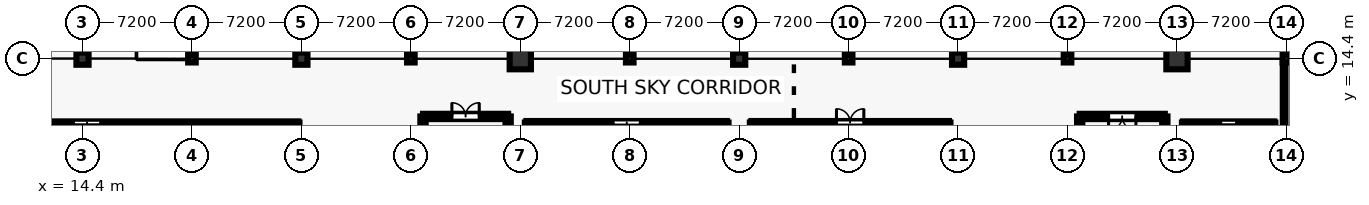
"""IFC4 building model, lengths in metres.
Left out: names, types, materials, properties, quantities, classifications, styles, units other than length and angle.
Written with IfcOpenShell. Run it as: python <this file> out.ifc"""

import sys

from ifc_helpers import new_model, si_unit, direction, frame, frame_2d, origin, origin_2d, place, context, subcontext, project, spatial, rectangle, circle, extrude, element, fill, save


model = new_model("IFC4")
c1 = context("Model", 3, precision=1e-05, world=origin(), true_north=direction((0.0, 1.0)))
c2 = subcontext(c1, "Body", "Model", "MODEL_VIEW")
j1 = project(units=[si_unit("LENGTHUNIT", "METRE"), si_unit("PLANEANGLEUNIT", "RADIAN")], contexts=[c1])
p1 = place(None, origin())
s1 = spatial("IfcSite", under=j1, at=p1, CompositionType="ELEMENT")
p2 = place(p1, origin())
s2 = spatial("IfcBuilding", under=s1, at=p2, CompositionType="ELEMENT")
p3 = place(p2, frame((0.0, 0.0, 23.0)))
s3 = spatial("IfcBuildingStorey", under=s2, at=p3, CompositionType="ELEMENT", Elevation=23.0)
p4 = place(p3, frame((14.4, 14.4, 0.0), z_axis=(0.0, 0.0, 1.0), x_axis=(1.0, 0.0, 0.0)))
e1 = element("IfcColumn", 1, at=p4, inside=s3, PredefinedType="COLUMN", context=c2, shape_type="SweptSolid", body=[
    extrude(circle(Radius=0.4, at=origin_2d()), origin(), (0.0, 0.0, 1.0), 5.92),
])
p5 = place(p3, frame((21.6, 14.4, 0.0), z_axis=(0.0, 0.0, 1.0), x_axis=(1.0, 0.0, 0.0)))
e2 = element("IfcColumn", 2, at=p5, inside=s3, PredefinedType="COLUMN", context=c2, shape_type="SweptSolid", body=[
    extrude(rectangle(XDim=0.5, YDim=0.5, at=origin_2d()), origin(), (0.0, 0.0, 1.0), 4.5),
])
p6 = place(p3, frame((28.8, 14.4, 0.0), z_axis=(0.0, 0.0, 1.0), x_axis=(1.0, 0.0, 0.0)))
e3 = element("IfcColumn", 3, at=p6, inside=s3, PredefinedType="COLUMN", context=c2, shape_type="SweptSolid", body=[
    extrude(circle(Radius=0.4, at=origin_2d()), origin(), (0.0, 0.0, 1.0), 4.75),
])
p7 = place(p3, frame((36.0, 14.4, 0.0), z_axis=(0.0, 0.0, 1.0), x_axis=(1.0, 0.0, 0.0)))
e4 = element("IfcColumn", 4, at=p7, inside=s3, PredefinedType="COLUMN", context=c2, shape_type="SweptSolid", body=[
    extrude(rectangle(XDim=0.5, YDim=0.5, at=origin_2d()), origin(), (0.0, 0.0, 1.0), 4.5),
])
p8 = place(p3, frame((43.2, 14.4, 0.0), z_axis=(0.0, 0.0, 1.0), x_axis=(1.0, 0.0, 0.0)))
e5 = element("IfcColumn", 5, at=p8, inside=s3, PredefinedType="COLUMN", context=c2, shape_type="SweptSolid", body=[
    extrude(circle(Radius=0.7, at=origin_2d()), origin(), (0.0, 0.0, 1.0), 4.75),
])
p9 = place(p3, frame((50.4, 14.4, 0.0), z_axis=(0.0, 0.0, 1.0), x_axis=(1.0, 0.0, 0.0)))
e6 = element("IfcColumn", 6, at=p9, inside=s3, PredefinedType="COLUMN", context=c2, shape_type="SweptSolid", body=[
    extrude(rectangle(XDim=0.5, YDim=0.5, at=origin_2d()), origin(), (0.0, 0.0, 1.0), 4.5),
])
p10 = place(p3, frame((57.6, 14.4, 0.0), z_axis=(0.0, 0.0, 1.0), x_axis=(1.0, 0.0, 0.0)))
e7 = element("IfcColumn", 7, at=p10, inside=s3, PredefinedType="COLUMN", context=c2, shape_type="SweptSolid", body=[
    extrude(circle(Radius=0.4, at=origin_2d()), origin(), (0.0, 0.0, 1.0), 4.75),
])
p11 = place(p3, frame((64.8, 14.4, 0.0), z_axis=(0.0, 0.0, 1.0), x_axis=(1.0, 0.0, 0.0)))
e8 = element("IfcColumn", 8, at=p11, inside=s3, PredefinedType="COLUMN", context=c2, shape_type="SweptSolid", body=[
    extrude(rectangle(XDim=0.5, YDim=0.5, at=origin_2d()), origin(), (0.0, 0.0, 1.0), 4.5),
])
p12 = place(p3, frame((72.0, 14.4, 0.0), z_axis=(0.0, 0.0, 1.0), x_axis=(1.0, 0.0, 0.0)))
e9 = element("IfcColumn", 9, at=p12, inside=s3, PredefinedType="COLUMN", context=c2, shape_type="SweptSolid", body=[
    extrude(circle(Radius=0.4, at=origin_2d()), origin(), (0.0, 0.0, 1.0), 4.75),
])
p13 = place(p3, frame((79.2, 14.4, 0.0), z_axis=(0.0, 0.0, 1.0), x_axis=(1.0, 0.0, 0.0)))
e10 = element("IfcColumn", 10, at=p13, inside=s3, PredefinedType="COLUMN", context=c2, shape_type="SweptSolid", body=[
    extrude(rectangle(XDim=0.5, YDim=0.5, at=origin_2d()), origin(), (0.0, 0.0, 1.0), 4.5),
])
p14 = place(p3, frame((86.4, 14.4, 0.0), z_axis=(0.0, 0.0, 1.0), x_axis=(1.0, 0.0, 0.0)))
e11 = element("IfcColumn", 11, at=p14, inside=s3, PredefinedType="COLUMN", context=c2, shape_type="SweptSolid", body=[
    extrude(circle(Radius=0.7, at=origin_2d()), origin(), (0.0, 0.0, 1.0), 4.75),
])
p15 = place(p3, frame((93.6, 14.4, 0.0), z_axis=(0.0, 0.0, 1.0), x_axis=(1.0, 0.0, 0.0)))
e12 = element("IfcColumn", 12, at=p15, inside=s3, PredefinedType="COLUMN", context=c2, shape_type="SweptSolid", body=[
    extrude(rectangle(XDim=0.5, YDim=0.5, at=origin_2d()), origin(), (0.0, 0.0, 1.0), 4.5),
])
p16 = place(p3, frame((14.4, 14.75, 0.0), z_axis=(0.0, 0.0, 1.0), x_axis=(0.0, 1.0, 0.0)))
e13 = element("IfcWall", 13, at=p16, inside=s3, PredefinedType="SOLIDWALL", context=c2, shape_type="SweptSolid", body=[
    extrude(rectangle(XDim=13.7, YDim=0.32, at=frame_2d((6.85, 0.0))), origin(), (0.0, 0.0, 1.0), 3.34),
])
p17 = place(p3, frame((93.45, 0.15, 4.5), z_axis=(0.0, 0.0, 1.0), x_axis=(0.0, 1.0, 0.0)))
e14 = element("IfcWall", 14, at=p17, inside=s3, PredefinedType="PARAPET", context=c2, shape_type="SweptSolid", body=[
    extrude(rectangle(XDim=14.1, YDim=0.18, at=frame_2d((7.05, 0.0))), origin(), (0.0, 0.0, 1.0), 1.15),
])
p18 = place(p3, frame((42.4, 6.8, 0.0), z_axis=(0.0, 0.0, 1.0), x_axis=(0.0, 1.0, 0.0)))
e15 = element("IfcWall", 15, at=p18, inside=s3, PredefinedType="SHEAR", context=c2, shape_type="SweptSolid", body=[
    extrude(rectangle(XDim=3.8, YDim=0.35, at=frame_2d((1.9, 0.0))), origin(), (0.0, 0.0, 1.0), 3.34),
])
p19 = place(p3, frame((42.4, 10.6, 0.0), z_axis=(0.0, 0.0, 1.0), x_axis=(-1.0, 0.0, 0.0)))
e16 = element("IfcWall", 16, at=p19, inside=s3, PredefinedType="SHEAR", context=c2, shape_type="SweptSolid", body=[
    extrude(rectangle(XDim=5.6, YDim=0.35, at=frame_2d((2.8, 0.0))), origin(), (0.0, 0.0, 1.0), 3.34),
])
p20 = place(p19, frame((1.9, 0.0, 0.0)))
e17 = element("IfcOpeningElement", 17, at=p20, cuts=e16, PredefinedType="OPENING", context=c2, shape_type="SweptSolid", body=[
    extrude(rectangle(XDim=1.8, YDim=2.3, at=frame_2d((0.9, 1.15))), frame((0.0, 0.185, 0.0), z_axis=(0.0, -1.0, 0.0), x_axis=(1.0, 0.0, 0.0)), (0.0, 0.0, 1.0), 0.37),
])
for number, where, z_axis, x_axis in (
    (18, (36.8, 10.6, 0.0), (0.0, 0.0, 1.0), (0.0, -1.0, 0.0)),
    (19, (85.6, 6.8, 0.0), (0.0, 0.0, 1.0), (0.0, 1.0, 0.0)),
):
    element("IfcWall", number, at=place(p3, frame(where, z_axis=z_axis, x_axis=x_axis)), inside=s3, PredefinedType="SHEAR", context=c2, shape_type="SweptSolid", body=[
        extrude(rectangle(XDim=3.8, YDim=0.35, at=frame_2d((1.9, 0.0))), origin(), (0.0, 0.0, 1.0), 3.34),
    ])
p21 = place(p3, frame((85.6, 10.6, 0.0), z_axis=(0.0, 0.0, 1.0), x_axis=(-1.0, 0.0, 0.0)))
e20 = element("IfcWall", 20, at=p21, inside=s3, PredefinedType="SHEAR", context=c2, shape_type="SweptSolid", body=[
    extrude(rectangle(XDim=5.6, YDim=0.35, at=frame_2d((2.8, 0.0))), origin(), (0.0, 0.0, 1.0), 3.34),
])
p22 = place(p21, frame((1.9, 0.0, 0.0)))
e21 = element("IfcOpeningElement", 21, at=p22, cuts=e20, PredefinedType="OPENING", context=c2, shape_type="SweptSolid", body=[
    extrude(rectangle(XDim=1.8, YDim=2.3, at=frame_2d((0.9, 1.15))), frame((0.0, 0.185, 0.0), z_axis=(0.0, -1.0, 0.0), x_axis=(1.0, 0.0, 0.0)), (0.0, 0.0, 1.0), 0.37),
])
p23 = place(p3, frame((80.0, 10.6, 0.0), z_axis=(0.0, 0.0, 1.0), x_axis=(0.0, -1.0, 0.0)))
e22 = element("IfcWall", 22, at=p23, inside=s3, PredefinedType="SHEAR", context=c2, shape_type="SweptSolid", body=[
    extrude(rectangle(XDim=3.8, YDim=0.35, at=frame_2d((1.9, 0.0))), origin(), (0.0, 0.0, 1.0), 3.34),
])
p24 = place(p3, frame((28.6, 0.8, 0.0), z_axis=(0.0, 0.0, 1.0), x_axis=(0.0, 1.0, 0.0)))
e23 = element("IfcWall", 23, at=p24, inside=s3, PredefinedType="PARTITIONING", context=c2, shape_type="SweptSolid", body=[
    extrude(rectangle(XDim=9.4, YDim=0.15, at=frame_2d((4.7, 0.0))), origin(), (0.0, 0.0, 1.0), 3.34),
])
p25 = place(p3, frame((28.6, 10.2, 0.0), z_axis=(0.0, 0.0, 1.0), x_axis=(-1.0, 0.0, 0.0)))
e24 = element("IfcWall", 24, at=p25, inside=s3, PredefinedType="PARTITIONING", context=c2, shape_type="SweptSolid", body=[
    extrude(rectangle(XDim=27.8, YDim=0.15, at=frame_2d((13.9, 0.0))), origin(), (0.0, 0.0, 1.0), 3.34),
])
p26 = place(p25, frame((13.0, 0.0, 0.0)))
e25 = element("IfcOpeningElement", 25, at=p26, cuts=e24, PredefinedType="OPENING", context=c2, shape_type="SweptSolid", body=[
    extrude(rectangle(XDim=1.8, YDim=2.3, at=frame_2d((0.9, 1.15))), frame((0.0, 0.085, 0.0), z_axis=(0.0, -1.0, 0.0), x_axis=(1.0, 0.0, 0.0)), (0.0, 0.0, 1.0), 0.17),
])
p27 = place(p3, frame((56.8, 0.8, 0.0), z_axis=(0.0, 0.0, 1.0), x_axis=(0.0, 1.0, 0.0)))
e26 = element("IfcWall", 26, at=p27, inside=s3, PredefinedType="PARTITIONING", context=c2, shape_type="SweptSolid", body=[
    extrude(rectangle(XDim=9.4, YDim=0.2, at=frame_2d((4.7, 0.0))), origin(), (0.0, 0.0, 1.0), 3.34),
])
p28 = place(p3, frame((56.8, 10.2, 0.0), z_axis=(0.0, 0.0, 1.0), x_axis=(-1.0, 0.0, 0.0)))
e27 = element("IfcWall", 27, at=p28, inside=s3, PredefinedType="PARTITIONING", context=c2, shape_type="SweptSolid", body=[
    extrude(rectangle(XDim=13.2, YDim=0.2, at=frame_2d((6.6, 0.0))), origin(), (0.0, 0.0, 1.0), 3.34),
])
p29 = place(p28, frame((5.7, 0.0, 0.0)))
e28 = element("IfcOpeningElement", 28, at=p29, cuts=e27, PredefinedType="OPENING", context=c2, shape_type="SweptSolid", body=[
    extrude(rectangle(XDim=1.8, YDim=2.3, at=frame_2d((0.9, 1.15))), frame((0.0, 0.11, 0.0), z_axis=(0.0, -1.0, 0.0), x_axis=(1.0, 0.0, 0.0)), (0.0, 0.0, 1.0), 0.22),
])
for number, where, z_axis, x_axis in (
    (29, (43.6, 10.2, 0.0), (0.0, 0.0, 1.0), (0.0, -1.0, 0.0)),
    (30, (71.4, 0.8, 0.0), (0.0, 0.0, 1.0), (0.0, 1.0, 0.0)),
):
    element("IfcWall", number, at=place(p3, frame(where, z_axis=z_axis, x_axis=x_axis)), inside=s3, PredefinedType="PARTITIONING", context=c2, shape_type="SweptSolid", body=[
        extrude(rectangle(XDim=9.4, YDim=0.2, at=frame_2d((4.7, 0.0))), origin(), (0.0, 0.0, 1.0), 3.34),
    ])
p30 = place(p3, frame((71.4, 10.2, 0.0), z_axis=(0.0, 0.0, 1.0), x_axis=(-1.0, 0.0, 0.0)))
e31 = element("IfcWall", 31, at=p30, inside=s3, PredefinedType="PARTITIONING", context=c2, shape_type="SweptSolid", body=[
    extrude(rectangle(XDim=13.0, YDim=0.2, at=frame_2d((6.5, 0.0))), origin(), (0.0, 0.0, 1.0), 3.34),
])
p31 = place(p30, frame((5.6, 0.0, 0.0)))
e32 = element("IfcOpeningElement", 32, at=p31, cuts=e31, PredefinedType="OPENING", context=c2, shape_type="SweptSolid", body=[
    extrude(rectangle(XDim=1.8, YDim=2.3, at=frame_2d((0.9, 1.15))), frame((0.0, 0.11, 0.0), z_axis=(0.0, -1.0, 0.0), x_axis=(1.0, 0.0, 0.0)), (0.0, 0.0, 1.0), 0.22),
])
p32 = place(p3, frame((58.4, 10.2, 0.0), z_axis=(0.0, 0.0, 1.0), x_axis=(0.0, -1.0, 0.0)))
e33 = element("IfcWall", 33, at=p32, inside=s3, PredefinedType="PARTITIONING", context=c2, shape_type="SweptSolid", body=[
    extrude(rectangle(XDim=9.4, YDim=0.2, at=frame_2d((4.7, 0.0))), origin(), (0.0, 0.0, 1.0), 3.34),
])
p33 = place(p3, frame((92.8, 0.8, 0.0), z_axis=(0.0, 0.0, 1.0), x_axis=(0.0, 1.0, 0.0)))
e34 = element("IfcWall", 34, at=p33, inside=s3, PredefinedType="PARTITIONING", context=c2, shape_type="SweptSolid", body=[
    extrude(rectangle(XDim=9.4, YDim=0.15, at=frame_2d((4.7, 0.0))), origin(), (0.0, 0.0, 1.0), 3.34),
])
p34 = place(p3, frame((92.8, 10.2, 0.0), z_axis=(0.0, 0.0, 1.0), x_axis=(-1.0, 0.0, 0.0)))
e35 = element("IfcWall", 35, at=p34, inside=s3, PredefinedType="PARTITIONING", context=c2, shape_type="SweptSolid", body=[
    extrude(rectangle(XDim=6.0, YDim=0.15, at=frame_2d((3.0, 0.0))), origin(), (0.0, 0.0, 1.0), 3.34),
])
p35 = place(p34, frame((2.475, 0.0, 0.0)))
e36 = element("IfcOpeningElement", 36, at=p35, cuts=e35, PredefinedType="OPENING", context=c2, shape_type="SweptSolid", body=[
    extrude(rectangle(XDim=1.05, YDim=2.2, at=frame_2d((0.525, 1.1))), frame((0.0, 0.085, 0.0), z_axis=(0.0, -1.0, 0.0), x_axis=(1.0, 0.0, 0.0)), (0.0, 0.0, 1.0), 0.17),
])
p36 = place(p3, frame((86.8, 10.2, 0.0), z_axis=(0.0, 0.0, 1.0), x_axis=(0.0, -1.0, 0.0)))
e37 = element("IfcWall", 37, at=p36, inside=s3, PredefinedType="PARTITIONING", context=c2, shape_type="SweptSolid", body=[
    extrude(rectangle(XDim=9.4, YDim=0.15, at=frame_2d((4.7, 0.0))), origin(), (0.0, 0.0, 1.0), 3.34),
])
p37 = place(p20, frame((1.8, 0.0, 0.0), z_axis=(0.0, 0.0, 1.0), x_axis=(-1.0, 0.0, 0.0)))
e38 = element("IfcDoor", 38, at=p37, inside=s3, OperationType="DOUBLE_DOOR_SINGLE_SWING", PredefinedType="DOOR", context=c2, shape_type="SweptSolid", body=[
    extrude(rectangle(XDim=1.8, YDim=2.3, at=frame_2d((0.9, 1.15))), frame((0.0, 0.025, 0.0), z_axis=(0.0, -1.0, 0.0), x_axis=(1.0, 0.0, 0.0)), (0.0, 0.0, 1.0), 0.05),
])
fill(e17, e38)
p38 = place(p22, origin())
e39 = element("IfcDoor", 39, at=p38, inside=s3, OperationType="DOUBLE_DOOR_SINGLE_SWING", PredefinedType="DOOR", context=c2, shape_type="SweptSolid", body=[
    extrude(rectangle(XDim=1.8, YDim=2.3, at=frame_2d((0.9, 1.15))), frame((0.0, 0.025, 0.0), z_axis=(0.0, -1.0, 0.0), x_axis=(1.0, 0.0, 0.0)), (0.0, 0.0, 1.0), 0.05),
])
fill(e21, e39)
p39 = place(p26, origin())
e40 = element("IfcDoor", 40, at=p39, inside=s3, OperationType="DOUBLE_DOOR_SINGLE_SWING", PredefinedType="DOOR", context=c2, shape_type="SweptSolid", body=[
    extrude(rectangle(XDim=1.8, YDim=2.3, at=frame_2d((0.9, 1.15))), frame((0.0, 0.025, 0.0), z_axis=(0.0, -1.0, 0.0), x_axis=(1.0, 0.0, 0.0)), (0.0, 0.0, 1.0), 0.05),
])
fill(e25, e40)
p40 = place(p29, origin())
e41 = element("IfcDoor", 41, at=p40, inside=s3, OperationType="DOUBLE_DOOR_SINGLE_SWING", PredefinedType="DOOR", context=c2, shape_type="SweptSolid", body=[
    extrude(rectangle(XDim=1.8, YDim=2.3, at=frame_2d((0.9, 1.15))), frame((0.0, 0.025, 0.0), z_axis=(0.0, -1.0, 0.0), x_axis=(1.0, 0.0, 0.0)), (0.0, 0.0, 1.0), 0.05),
])
fill(e28, e41)
p41 = place(p31, frame((1.8, 0.0, 0.0), z_axis=(0.0, 0.0, 1.0), x_axis=(-1.0, 0.0, 0.0)))
e42 = element("IfcDoor", 42, at=p41, inside=s3, OperationType="DOUBLE_DOOR_SINGLE_SWING", PredefinedType="DOOR", context=c2, shape_type="SweptSolid", body=[
    extrude(rectangle(XDim=1.8, YDim=2.3, at=frame_2d((0.9, 1.15))), frame((0.0, 0.025, 0.0), z_axis=(0.0, -1.0, 0.0), x_axis=(1.0, 0.0, 0.0)), (0.0, 0.0, 1.0), 0.05),
])
fill(e32, e42)
p42 = place(p35, origin())
e43 = element("IfcDoor", 43, at=p42, inside=s3, OperationType="SINGLE_SWING_LEFT", PredefinedType="DOOR", context=c2, shape_type="SweptSolid", body=[
    extrude(rectangle(XDim=1.05, YDim=2.2, at=frame_2d((0.525, 1.1))), frame((0.0, 0.025, 0.0), z_axis=(0.0, -1.0, 0.0), x_axis=(1.0, 0.0, 0.0)), (0.0, 0.0, 1.0), 0.05),
])
fill(e36, e43)
save(model, sys.argv[1])
